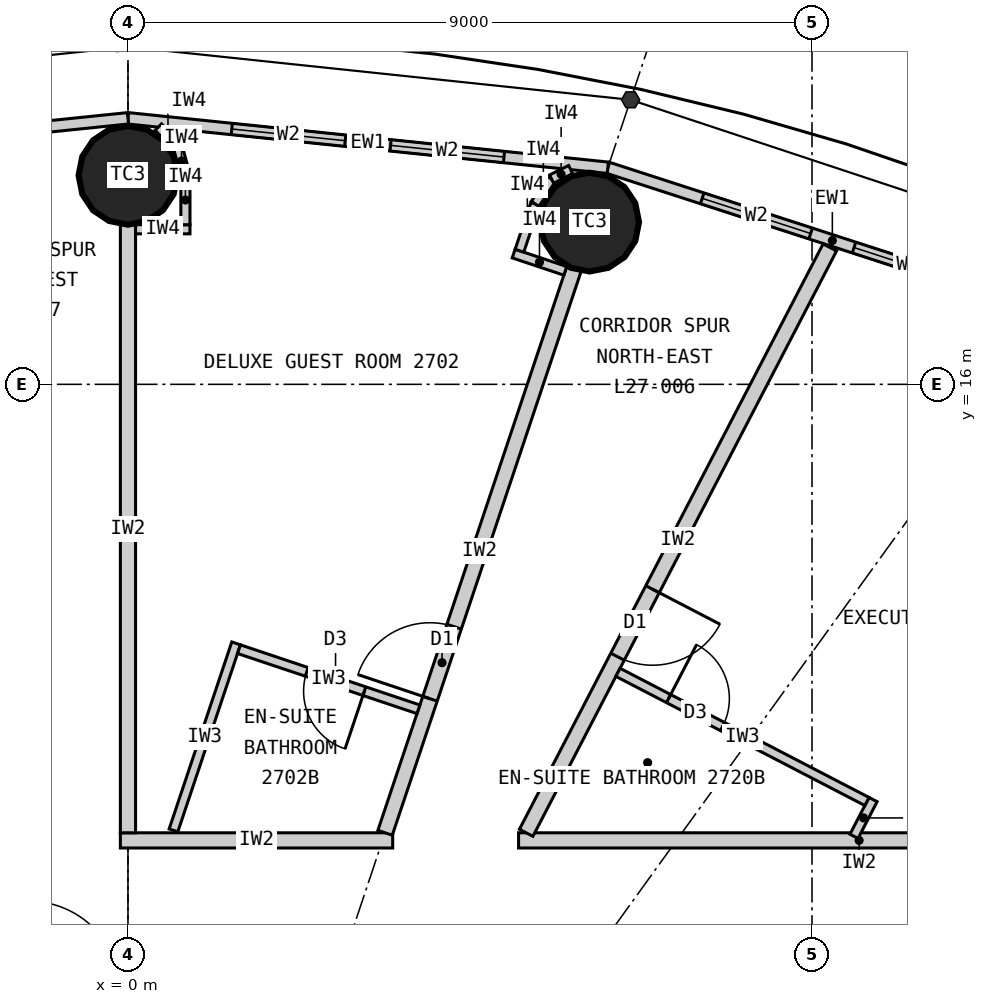
"""IFC4 building model, lengths in metres.
Left out: names, types, materials, properties, quantities, classifications, styles, units other than length and angle.
Written with IfcOpenShell. Run it as: python <this file> out.ifc"""

import sys

from ifc_helpers import new_model, si_unit, direction, frame, frame_2d, origin, origin_2d, place, context, subcontext, project, spatial, rectangle, circle, extrude, element, fill, save


model = new_model("IFC4")
c1 = context("Model", 3, precision=1e-05, world=origin(), true_north=direction((0.0, 1.0)))
c2 = subcontext(c1, "Body", "Model", "MODEL_VIEW")
j1 = project(units=[si_unit("LENGTHUNIT", "METRE"), si_unit("PLANEANGLEUNIT", "RADIAN")], contexts=[c1])
p1 = place(None, origin())
s1 = spatial("IfcSite", under=j1, at=p1, CompositionType="ELEMENT")
p2 = place(p1, origin())
s2 = spatial("IfcBuilding", under=s1, at=p2, CompositionType="ELEMENT")
p3 = place(p2, frame((0.0, 0.0, 108.9)))
s3 = spatial("IfcBuildingStorey", under=s2, at=p3, CompositionType="ELEMENT", Elevation=108.9)
for number, where, z_axis, x_axis in (
    (1, (6.074, 18.135, 0.0), (0.0, 0.0, 1.0), (1.0, 0.0, 0.0)),
    (2, (0.0, 18.75, 0.0), (0.0, 0.0, 1.0), (1.0, 0.0, 0.0)),
):
    element("IfcColumn", number, at=place(p3, frame(where, z_axis=z_axis, x_axis=x_axis)), inside=s3, PredefinedType="COLUMN", context=c2, shape_type="SweptSolid", body=[
        extrude(circle(Radius=0.65, at=origin_2d()), origin(), (0.0, 0.0, 1.0), 3.3),
    ])
p4 = place(p3, frame((12.221, 16.935, 0.0), z_axis=(0.0, 0.0, 1.0), x_axis=(-0.951272691506, 0.308350881944, 0.0)))
e3 = element("IfcWall", 3, at=p4, inside=s3, PredefinedType="ELEMENTEDWALL", context=c2, shape_type="SweptSolid", body=[
    extrude(rectangle(XDim=6.211, YDim=0.15, at=frame_2d((3.105, 0.0))), origin(), (0.0, 0.0, 1.0), 3.12),
])
p5 = place(p4, frame((1.305, 0.0, 0.9)))
e4 = element("IfcOpeningElement", 4, at=p5, cuts=e3, PredefinedType="OPENING", context=c2, shape_type="SweptSolid", body=[
    extrude(rectangle(XDim=1.5, YDim=1.9, at=frame_2d((0.75, 0.95))), frame((0.0, 0.085, 0.0), z_axis=(0.0, -1.0, 0.0), x_axis=(1.0, 0.0, 0.0)), (0.0, 0.0, 1.0), 0.17),
])
p6 = place(p4, frame((3.405, 0.0, 0.9)))
e5 = element("IfcOpeningElement", 5, at=p6, cuts=e3, PredefinedType="OPENING", context=c2, shape_type="SweptSolid", body=[
    extrude(rectangle(XDim=1.5, YDim=1.9, at=frame_2d((0.75, 0.95))), frame((0.0, 0.085, 0.0), z_axis=(0.0, -1.0, 0.0), x_axis=(1.0, 0.0, 0.0)), (0.0, 0.0, 1.0), 0.17),
])
p7 = place(p3, frame((6.313, 18.85, 0.0), z_axis=(0.0, 0.0, 1.0), x_axis=(-0.994735690163, 0.102473931887, 0.0)))
e6 = element("IfcWall", 6, at=p7, inside=s3, PredefinedType="ELEMENTEDWALL", context=c2, shape_type="SweptSolid", body=[
    extrude(rectangle(XDim=6.347, YDim=0.15, at=frame_2d((3.173, 0.0))), origin(), (0.0, 0.0, 1.0), 3.12),
])
p8 = place(p7, frame((1.373, 0.0, 0.9)))
e7 = element("IfcOpeningElement", 7, at=p8, cuts=e6, PredefinedType="OPENING", context=c2, shape_type="SweptSolid", body=[
    extrude(rectangle(XDim=1.5, YDim=1.9, at=frame_2d((0.75, 0.95))), frame((0.0, 0.085, 0.0), z_axis=(0.0, -1.0, 0.0), x_axis=(1.0, 0.0, 0.0)), (0.0, 0.0, 1.0), 0.17),
])
p9 = place(p7, frame((3.473, 0.0, 0.9)))
e8 = element("IfcOpeningElement", 8, at=p9, cuts=e6, PredefinedType="OPENING", context=c2, shape_type="SweptSolid", body=[
    extrude(rectangle(XDim=1.5, YDim=1.9, at=frame_2d((0.75, 0.95))), frame((0.0, 0.085, 0.0), z_axis=(0.0, -1.0, 0.0), x_axis=(1.0, 0.0, 0.0)), (0.0, 0.0, 1.0), 0.17),
])
p10 = place(p3, frame((0.0, 19.5, 0.0), z_axis=(0.0, 0.0, 1.0), x_axis=(-0.994735690163, -0.102473931887, 0.0)))
e9 = element("IfcWall", 9, at=p10, inside=s3, PredefinedType="ELEMENTEDWALL", context=c2, shape_type="SweptSolid", body=[
    extrude(rectangle(XDim=6.347, YDim=0.15, at=frame_2d((3.173, 0.0))), origin(), (0.0, 0.0, 1.0), 3.12),
])
p11 = place(p10, frame((1.373, 0.0, 0.9)))
e10 = element("IfcOpeningElement", 10, at=p11, cuts=e9, PredefinedType="OPENING", context=c2, shape_type="SweptSolid", body=[
    extrude(rectangle(XDim=1.5, YDim=1.9, at=frame_2d((0.75, 0.95))), frame((0.0, 0.085, 0.0), z_axis=(0.0, -1.0, 0.0), x_axis=(1.0, 0.0, 0.0)), (0.0, 0.0, 1.0), 0.17),
])
p12 = place(p10, frame((3.473, 0.0, 0.9)))
e11 = element("IfcOpeningElement", 11, at=p12, cuts=e9, PredefinedType="OPENING", context=c2, shape_type="SweptSolid", body=[
    extrude(rectangle(XDim=1.5, YDim=1.9, at=frame_2d((0.75, 0.95))), frame((0.0, 0.085, 0.0), z_axis=(0.0, -1.0, 0.0), x_axis=(1.0, 0.0, 0.0)), (0.0, 0.0, 1.0), 0.17),
])
p13 = place(p3, frame((-0.1, 10.0, 0.0), z_axis=(0.0, 0.0, 1.0), x_axis=(1.0, 0.0, 0.0)))
e12 = element("IfcWall", 12, at=p13, inside=s3, PredefinedType="PARTITIONING", context=c2, shape_type="SweptSolid", body=[
    extrude(rectangle(XDim=3.583, YDim=0.2, at=frame_2d((1.792, 0.0))), origin(), (0.0, 0.0, 1.0), 3.12),
])
p14 = place(p3, frame((5.139, 10.0, 0.0), z_axis=(0.0, 0.0, 1.0), x_axis=(1.0, 0.0, 0.0)))
e13 = element("IfcWall", 13, at=p14, inside=s3, PredefinedType="PARTITIONING", context=c2, shape_type="SweptSolid", body=[
    extrude(rectangle(XDim=8.961, YDim=0.2, at=frame_2d((4.48, 0.0))), origin(), (0.0, 0.0, 1.0), 3.12),
])
p15 = place(p3, frame((5.239, 10.1, 0.0), z_axis=(0.0, 0.0, 1.0), x_axis=(0.4604797896, 0.887670188398, 0.0)))
e14 = element("IfcWall", 14, at=p15, inside=s3, PredefinedType="PARTITIONING", context=c2, shape_type="SweptSolid", body=[
    extrude(rectangle(XDim=8.676, YDim=0.2, at=frame_2d((4.338, 0.0))), origin(), (0.0, 0.0, 1.0), 3.12),
])
p16 = place(p15, frame((2.61, 0.0, 0.0)))
e15 = element("IfcOpeningElement", 15, at=p16, cuts=e14, PredefinedType="OPENING", context=c2, shape_type="SweptSolid", body=[
    extrude(rectangle(XDim=1.0, YDim=2.2, at=frame_2d((0.5, 1.1))), frame((0.0, 0.11, 0.0), z_axis=(0.0, -1.0, 0.0), x_axis=(1.0, 0.0, 0.0)), (0.0, 0.0, 1.0), 0.22),
])
p17 = place(p3, frame((3.383, 10.1, 0.0), z_axis=(0.0, 0.0, 1.0), x_axis=(0.317603705574, 0.948223542318, 0.0)))
e16 = element("IfcWall", 16, at=p17, inside=s3, PredefinedType="PARTITIONING", context=c2, shape_type="SweptSolid", body=[
    extrude(rectangle(XDim=7.823, YDim=0.2, at=frame_2d((3.912, 0.0))), origin(), (0.0, 0.0, 1.0), 2.37),
])
p18 = place(p17, frame((1.86, 0.0, 0.0)))
e17 = element("IfcOpeningElement", 17, at=p18, cuts=e16, PredefinedType="OPENING", context=c2, shape_type="SweptSolid", body=[
    extrude(rectangle(XDim=1.0, YDim=2.2, at=frame_2d((0.5, 1.1))), frame((0.0, 0.11, 0.0), z_axis=(0.0, -1.0, 0.0), x_axis=(1.0, 0.0, 0.0)), (0.0, 0.0, 1.0), 0.22),
])
p19 = place(p3, frame((0.0, 10.1, 0.0), z_axis=(0.0, 0.0, 1.0), x_axis=(0.0, 1.0, 0.0)))
e18 = element("IfcWall", 18, at=p19, inside=s3, PredefinedType="PARTITIONING", context=c2, shape_type="SweptSolid", body=[
    extrude(rectangle(XDim=8.0, YDim=0.2, at=frame_2d((4.0, 0.0))), origin(), (0.0, 0.0, 1.0), 2.37),
])
p20 = place(p3, frame((0.599, 10.132, 0.0), z_axis=(0.0, 0.0, 1.0), x_axis=(0.317554522053, 0.948240014724, 0.0)))
e19 = element("IfcWall", 19, at=p20, inside=s3, PredefinedType="PARTITIONING", context=c2, shape_type="SweptSolid", body=[
    extrude(rectangle(XDim=2.594, YDim=0.12, at=frame_2d((1.297, 0.0))), origin(), (0.0, 0.0, 1.0), 3.12),
])
p21 = place(p3, frame((3.822, 11.725, 0.0), z_axis=(0.0, 0.0, 1.0), x_axis=(-0.948231307998, 0.317580519761, 0.0)))
e20 = element("IfcWall", 20, at=p21, inside=s3, PredefinedType="PARTITIONING", context=c2, shape_type="SweptSolid", body=[
    extrude(rectangle(XDim=2.49, YDim=0.12, at=frame_2d((1.245, 0.0))), origin(), (0.0, 0.0, 1.0), 3.12),
])
p22 = place(p21, frame((0.75, 0.0, 0.0)))
e21 = element("IfcOpeningElement", 21, at=p22, cuts=e20, PredefinedType="OPENING", context=c2, shape_type="SweptSolid", body=[
    extrude(rectangle(XDim=0.8, YDim=2.1, at=frame_2d((0.4, 1.05))), frame((0.0, 0.07, 0.0), z_axis=(0.0, -1.0, 0.0), x_axis=(1.0, 0.0, 0.0)), (0.0, 0.0, 1.0), 0.14),
])
p23 = place(p3, frame((9.552, 10.054, 0.0), z_axis=(0.0, 0.0, 1.0), x_axis=(0.460604866949, 0.887605293215, 0.0)))
e22 = element("IfcWall", 22, at=p23, inside=s3, PredefinedType="PARTITIONING", context=c2, shape_type="SweptSolid", body=[
    extrude(rectangle(XDim=0.545, YDim=0.12, at=frame_2d((0.272, 0.0))), origin(), (0.0, 0.0, 1.0), 3.12),
])
p24 = place(p3, frame((6.447, 12.211, 0.0), z_axis=(0.0, 0.0, 1.0), x_axis=(0.887685422499, -0.460450421525, 0.0)))
e23 = element("IfcWall", 23, at=p24, inside=s3, PredefinedType="PARTITIONING", context=c2, shape_type="SweptSolid", body=[
    extrude(rectangle(XDim=3.69, YDim=0.12, at=frame_2d((1.845, 0.0))), origin(), (0.0, 0.0, 1.0), 3.12),
])
p25 = place(p24, frame((0.75, 0.0, 0.0)))
e24 = element("IfcOpeningElement", 24, at=p25, cuts=e23, PredefinedType="OPENING", context=c2, shape_type="SweptSolid", body=[
    extrude(rectangle(XDim=0.8, YDim=2.1, at=frame_2d((0.4, 1.05))), frame((0.0, 0.07, 0.0), z_axis=(0.0, -1.0, 0.0), x_axis=(1.0, 0.0, 0.0)), (0.0, 0.0, 1.0), 0.14),
])
p26 = place(p3, frame((5.754, 17.493, 0.0), z_axis=(0.0, 0.0, 1.0), x_axis=(-0.9482389443, 0.317557718397, 0.0)))
e25 = element("IfcWall", 25, at=p26, inside=s3, PredefinedType="PARTITIONING", context=c2, shape_type="SweptSolid", body=[
    extrude(rectangle(XDim=0.716, YDim=0.12, at=frame_2d((0.358, 0.0))), origin(), (0.0, 0.0, 1.0), 3.12),
])
p27 = place(p3, frame((5.151, 17.758, 0.0), z_axis=(0.0, 0.0, 1.0), x_axis=(0.317354244456, 0.948307061835, 0.0)))
e26 = element("IfcWall", 26, at=p27, inside=s3, PredefinedType="PARTITIONING", context=c2, shape_type="SweptSolid", body=[
    extrude(rectangle(XDim=0.65, YDim=0.12, at=frame_2d((0.325, 0.0))), origin(), (0.0, 0.0, 1.0), 3.12),
])
p28 = place(p3, frame((5.357, 18.375, 0.0), z_axis=(0.0, 0.0, 1.0), x_axis=(0.552249752128, 0.833678721856, 0.0)))
e27 = element("IfcWall", 27, at=p28, inside=s3, PredefinedType="PARTITIONING", context=c2, shape_type="SweptSolid", body=[
    extrude(rectangle(XDim=0.391, YDim=0.12, at=frame_2d((0.196, 0.0))), origin(), (0.0, 0.0, 1.0), 3.12),
])
p29 = place(p3, frame((5.573, 18.701, 0.0), z_axis=(0.0, 0.0, 1.0), x_axis=(0.895295561985, 0.445472621707, 0.0)))
e28 = element("IfcWall", 28, at=p29, inside=s3, PredefinedType="PARTITIONING", context=c2, shape_type="SweptSolid", body=[
    extrude(rectangle(XDim=0.281, YDim=0.12, at=frame_2d((0.14, 0.0))), origin(), (0.0, 0.0, 1.0), 3.12),
])
p30 = place(p3, frame((0.1, 18.04, 0.0), z_axis=(0.0, 0.0, 1.0), x_axis=(1.0, 0.0, 0.0)))
e29 = element("IfcWall", 29, at=p30, inside=s3, PredefinedType="PARTITIONING", context=c2, shape_type="SweptSolid", body=[
    extrude(rectangle(XDim=0.716, YDim=0.12, at=frame_2d((0.358, 0.0))), origin(), (0.0, 0.0, 1.0), 3.12),
])
p31 = place(p3, frame((0.756, 18.1, 0.0), z_axis=(0.0, 0.0, 1.0), x_axis=(0.0, 1.0, 0.0)))
e30 = element("IfcWall", 30, at=p31, inside=s3, PredefinedType="PARTITIONING", context=c2, shape_type="SweptSolid", body=[
    extrude(rectangle(XDim=0.65, YDim=0.12, at=frame_2d((0.325, 0.0))), origin(), (0.0, 0.0, 1.0), 3.12),
])
p32 = place(p3, frame((0.756, 18.75, 0.0), z_axis=(0.0, 0.0, 1.0), x_axis=(-0.2589440045, 0.965892334856, 0.0)))
e31 = element("IfcWall", 31, at=p32, inside=s3, PredefinedType="PARTITIONING", context=c2, shape_type="SweptSolid", body=[
    extrude(rectangle(XDim=0.391, YDim=0.12, at=frame_2d((0.196, 0.0))), origin(), (0.0, 0.0, 1.0), 3.12),
])
p33 = place(p3, frame((0.655, 19.128, 0.0), z_axis=(0.0, 0.0, 1.0), x_axis=(-0.707443899976, 0.706769501596, 0.0)))
e32 = element("IfcWall", 32, at=p33, inside=s3, PredefinedType="PARTITIONING", context=c2, shape_type="SweptSolid", body=[
    extrude(rectangle(XDim=0.362, YDim=0.12, at=frame_2d((0.181, 0.0))), origin(), (0.0, 0.0, 1.0), 3.12),
])
p34 = place(p5, origin())
e33 = element("IfcWindow", 33, at=p34, inside=s3, PartitioningType="SINGLE_PANEL", PredefinedType="WINDOW", context=c2, shape_type="SweptSolid", body=[
    extrude(rectangle(XDim=1.5, YDim=1.9, at=frame_2d((0.75, 0.95))), frame((0.0, 0.03, 0.0), z_axis=(0.0, -1.0, 0.0), x_axis=(1.0, 0.0, 0.0)), (0.0, 0.0, 1.0), 0.06),
])
fill(e4, e33)
p35 = place(p6, origin())
e34 = element("IfcWindow", 34, at=p35, inside=s3, PartitioningType="SINGLE_PANEL", PredefinedType="WINDOW", context=c2, shape_type="SweptSolid", body=[
    extrude(rectangle(XDim=1.5, YDim=1.9, at=frame_2d((0.75, 0.95))), frame((0.0, 0.03, 0.0), z_axis=(0.0, -1.0, 0.0), x_axis=(1.0, 0.0, 0.0)), (0.0, 0.0, 1.0), 0.06),
])
fill(e5, e34)
p36 = place(p8, origin())
e35 = element("IfcWindow", 35, at=p36, inside=s3, PartitioningType="SINGLE_PANEL", PredefinedType="WINDOW", context=c2, shape_type="SweptSolid", body=[
    extrude(rectangle(XDim=1.5, YDim=1.9, at=frame_2d((0.75, 0.95))), frame((0.0, 0.03, 0.0), z_axis=(0.0, -1.0, 0.0), x_axis=(1.0, 0.0, 0.0)), (0.0, 0.0, 1.0), 0.06),
])
fill(e7, e35)
p37 = place(p9, origin())
e36 = element("IfcWindow", 36, at=p37, inside=s3, PartitioningType="SINGLE_PANEL", PredefinedType="WINDOW", context=c2, shape_type="SweptSolid", body=[
    extrude(rectangle(XDim=1.5, YDim=1.9, at=frame_2d((0.75, 0.95))), frame((0.0, 0.03, 0.0), z_axis=(0.0, -1.0, 0.0), x_axis=(1.0, 0.0, 0.0)), (0.0, 0.0, 1.0), 0.06),
])
fill(e8, e36)
p38 = place(p22, origin())
e37 = element("IfcDoor", 37, at=p38, inside=s3, OperationType="SINGLE_SWING_LEFT", PredefinedType="DOOR", context=c2, shape_type="SweptSolid", body=[
    extrude(rectangle(XDim=0.8, YDim=2.1, at=frame_2d((0.4, 1.05))), frame((0.0, 0.025, 0.0), z_axis=(0.0, -1.0, 0.0), x_axis=(1.0, 0.0, 0.0)), (0.0, 0.0, 1.0), 0.05),
])
fill(e21, e37)
p39 = place(p18, origin())
e38 = element("IfcDoor", 38, at=p39, inside=s3, OperationType="SINGLE_SWING_LEFT", PredefinedType="DOOR", context=c2, shape_type="SweptSolid", body=[
    extrude(rectangle(XDim=1.0, YDim=2.2, at=frame_2d((0.5, 1.1))), frame((0.0, 0.025, 0.0), z_axis=(0.0, -1.0, 0.0), x_axis=(1.0, 0.0, 0.0)), (0.0, 0.0, 1.0), 0.05),
])
fill(e17, e38)
p40 = place(p25, origin())
e39 = element("IfcDoor", 39, at=p40, inside=s3, OperationType="SINGLE_SWING_LEFT", PredefinedType="DOOR", context=c2, shape_type="SweptSolid", body=[
    extrude(rectangle(XDim=0.8, YDim=2.1, at=frame_2d((0.4, 1.05))), frame((0.0, 0.025, 0.0), z_axis=(0.0, -1.0, 0.0), x_axis=(1.0, 0.0, 0.0)), (0.0, 0.0, 1.0), 0.05),
])
fill(e24, e39)
p41 = place(p16, origin())
e40 = element("IfcDoor", 40, at=p41, inside=s3, OperationType="SINGLE_SWING_RIGHT", PredefinedType="DOOR", context=c2, shape_type="SweptSolid", body=[
    extrude(rectangle(XDim=1.0, YDim=2.2, at=frame_2d((0.5, 1.1))), frame((0.0, 0.025, 0.0), z_axis=(0.0, -1.0, 0.0), x_axis=(1.0, 0.0, 0.0)), (0.0, 0.0, 1.0), 0.05),
])
fill(e15, e40)
save(model, sys.argv[1])
